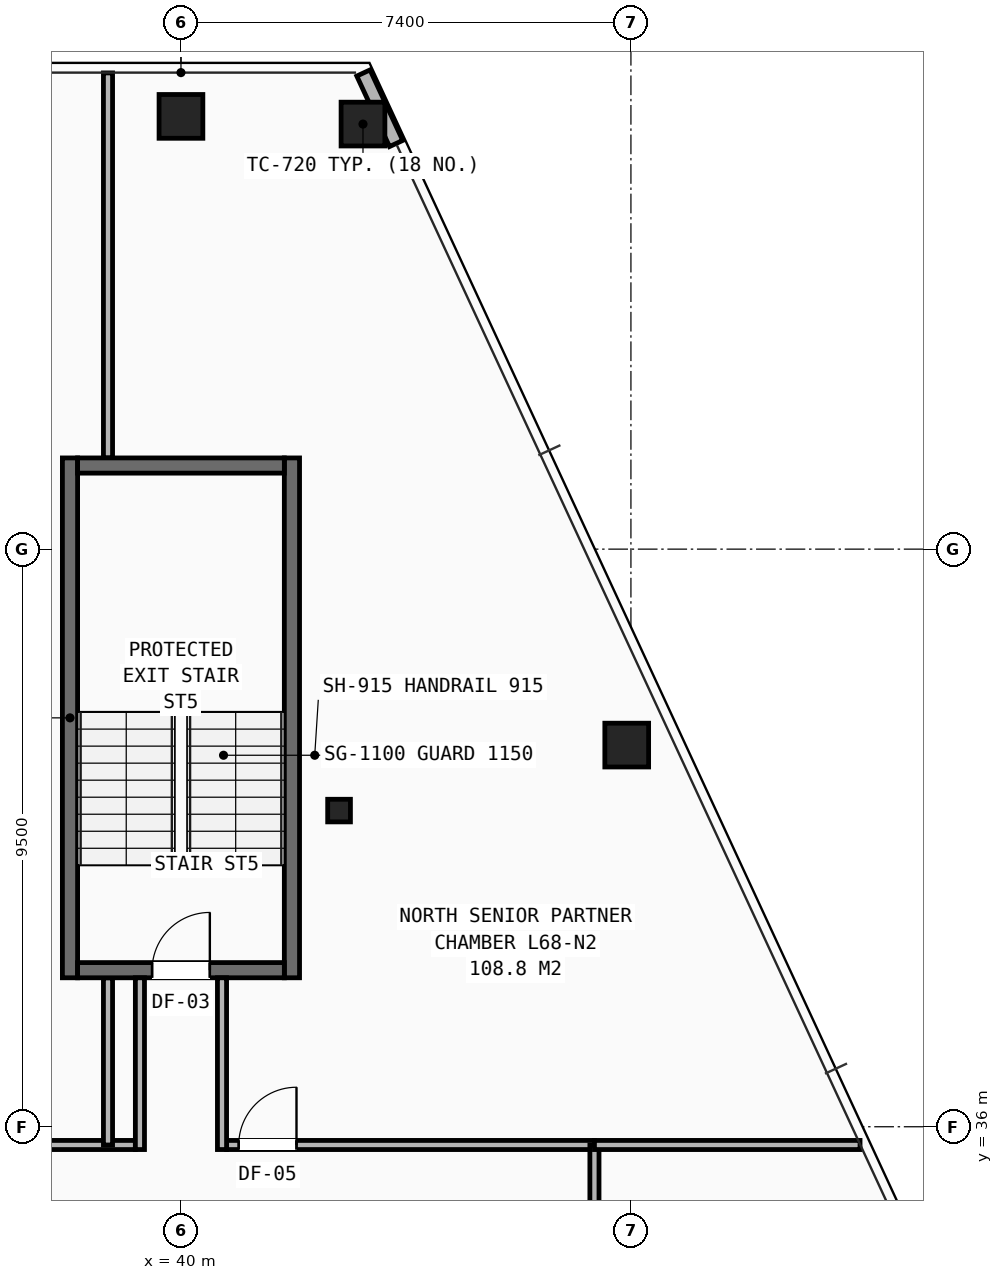
"""IFC4 building model, lengths in metres.
Left out: names, types, materials, properties, quantities, classifications, styles, units other than length and angle.
Written with IfcOpenShell. Run it as: python <this file> out.ifc"""

import sys

from ifc_helpers import new_model, si_unit, direction, frame, frame_2d, origin, origin_2d, place, context, subcontext, project, spatial, rectangle, hollow_rectangle, i_section, extrude, element, fill, save


model = new_model("IFC4")
c1 = context("Model", 3, precision=1e-05, world=origin(), true_north=direction((0.0, 1.0)))
c2 = subcontext(c1, "Body", "Model", "MODEL_VIEW")
j1 = project(units=[si_unit("LENGTHUNIT", "METRE"), si_unit("PLANEANGLEUNIT", "RADIAN")], contexts=[c1])
p1 = place(None, origin())
s1 = spatial("IfcSite", under=j1, at=p1, CompositionType="ELEMENT")
p2 = place(p1, origin())
s2 = spatial("IfcBuilding", under=s1, at=p2, CompositionType="ELEMENT")
p3 = place(p2, frame((0.0, 0.0, 239.9)))
s3 = spatial("IfcBuildingStorey", under=s2, at=p3, CompositionType="ELEMENT", Elevation=239.9)
p4 = place(p3, frame((42.6, 41.2, 0.0), z_axis=(0.0, 0.0, 1.0), x_axis=(1.0, 0.0, 0.0)))
e1 = element("IfcColumn", 1, at=p4, inside=s3, PredefinedType="COLUMN", context=c2, shape_type="SweptSolid", body=[
    extrude(i_section(OverallWidth=0.374, OverallDepth=0.372, WebThickness=0.016, FlangeThickness=0.026, at=origin_2d()), origin(), (0.0, 0.0, 1.0), 3.5),
])
for number, where, z_axis, x_axis in (
    (2, (42.993, 52.491, 0.0), (0.0, 0.0, 1.0), (1.0, 0.0, 0.0)),
    (3, (40.0, 52.617, 0.0), (0.0, 0.0, 1.0), (1.0, 0.0, 0.0)),
    (4, (47.331, 42.277, 0.0), (0.0, 0.0, 1.0), (1.0, 0.0, 0.0)),
):
    element("IfcColumn", number, at=place(p3, frame(where, z_axis=z_axis, x_axis=x_axis)), inside=s3, PredefinedType="COLUMN", context=c2, shape_type="SweptSolid", body=[
        extrude(hollow_rectangle(XDim=0.72, YDim=0.72, WallThickness=0.05, at=origin_2d()), origin(), (0.0, 0.0, 1.0), 3.5),
    ])
p5 = place(p3, frame((43.538, 52.171, 0.0), z_axis=(0.0, 0.0, 1.0), x_axis=(-0.420510858271, 0.907287505742, 0.0)))
e5 = element("IfcWall", 5, at=p5, inside=s3, PredefinedType="SHEAR", context=c2, shape_type="SweptSolid", body=[
    extrude(rectangle(XDim=1.278, YDim=0.24, at=frame_2d((0.639, 0.0))), origin(), (0.0, 0.0, 1.0), 2.623),
])
p6 = place(p3, frame((29.8, 35.7, 0.0), z_axis=(0.0, 0.0, 1.0), x_axis=(1.0, 0.0, 0.0)))
e6 = element("IfcWall", 6, at=p6, inside=s3, PredefinedType="PARTITIONING", context=c2, shape_type="SweptSolid", body=[
    extrude(rectangle(XDim=9.45, YDim=0.15, at=frame_2d((4.725, 0.0))), origin(), (0.0, 0.0, 1.0), 2.628),
])
p7 = place(p6, frame((0.55, 0.0, 0.0)))
e7 = element("IfcOpeningElement", 7, at=p7, cuts=e6, PredefinedType="OPENING", context=c2, shape_type="SweptSolid", body=[
    extrude(rectangle(XDim=0.95, YDim=2.1, at=frame_2d((0.475, 1.05))), frame((0.0, 0.085, 0.0), z_axis=(0.0, -1.0, 0.0), x_axis=(1.0, 0.0, 0.0)), (0.0, 0.0, 1.0), 0.17),
])
p8 = place(p3, frame((40.75, 35.7, 0.0), z_axis=(0.0, 0.0, 1.0), x_axis=(1.0, 0.0, 0.0)))
e8 = element("IfcWall", 8, at=p8, inside=s3, PredefinedType="PARTITIONING", context=c2, shape_type="SweptSolid", body=[
    extrude(rectangle(XDim=6.05, YDim=0.15, at=frame_2d((3.025, 0.0))), origin(), (0.0, 0.0, 1.0), 3.25),
])
p9 = place(p8, frame((0.2, 0.0, 0.0)))
e9 = element("IfcOpeningElement", 9, at=p9, cuts=e8, PredefinedType="OPENING", context=c2, shape_type="SweptSolid", body=[
    extrude(rectangle(XDim=0.95, YDim=2.1, at=frame_2d((0.475, 1.05))), frame((0.0, 0.085, 0.0), z_axis=(0.0, -1.0, 0.0), x_axis=(1.0, 0.0, 0.0)), (0.0, 0.0, 1.0), 0.17),
])
p10 = place(p3, frame((46.8, 31.2, 0.0), z_axis=(0.0, 0.0, 1.0), x_axis=(0.0, 1.0, 0.0)))
e10 = element("IfcWall", 10, at=p10, inside=s3, PredefinedType="PARTITIONING", context=c2, shape_type="SweptSolid", body=[
    extrude(rectangle(XDim=4.5, YDim=0.15, at=frame_2d((2.25, 0.0))), origin(), (0.0, 0.0, 1.0), 2.705),
])
p11 = place(p3, frame((46.8, 35.7, 0.0), z_axis=(0.0, 0.0, 1.0), x_axis=(1.0, 0.0, 0.0)))
e11 = element("IfcWall", 11, at=p11, inside=s3, PredefinedType="PARTITIONING", context=c2, shape_type="SweptSolid", body=[
    extrude(rectangle(XDim=4.368, YDim=0.15, at=frame_2d((2.184, 0.0))), origin(), (0.0, 0.0, 1.0), 2.628),
])
p12 = place(p3, frame((38.8, 35.7, 0.0), z_axis=(0.0, 0.0, 1.0), x_axis=(0.0, 1.0, 0.0)))
e12 = element("IfcWall", 12, at=p12, inside=s3, PredefinedType="PARTITIONING", context=c2, shape_type="SweptSolid", body=[
    extrude(rectangle(XDim=2.75, YDim=0.15, at=frame_2d((1.375, 0.0))), origin(), (0.0, 0.0, 1.0), 3.25),
])
p13 = place(p3, frame((38.8, 47.0, 0.0), z_axis=(0.0, 0.0, 1.0), x_axis=(0.0, 1.0, 0.0)))
e13 = element("IfcWall", 13, at=p13, inside=s3, PredefinedType="PARTITIONING", context=c2, shape_type="SweptSolid", body=[
    extrude(rectangle(XDim=6.332, YDim=0.15, at=frame_2d((3.166, 0.0))), origin(), (0.0, 0.0, 1.0), 2.628),
])
for number, where, z_axis, x_axis in (
    (14, (38.175, 38.45, 0.0), (0.0, 0.0, 1.0), (0.0, 1.0, 0.0)),
    (15, (41.825, 38.45, 0.0), (0.0, 0.0, 1.0), (0.0, 1.0, 0.0)),
):
    element("IfcWall", number, at=place(p3, frame(where, z_axis=z_axis, x_axis=x_axis)), inside=s3, PredefinedType="SHEAR", context=c2, shape_type="SweptSolid", body=[
        extrude(rectangle(XDim=8.55, YDim=0.25, at=frame_2d((4.275, 0.0))), origin(), (0.0, 0.0, 1.0), 3.25),
    ])
p14 = place(p3, frame((38.3, 38.575, 0.0), z_axis=(0.0, 0.0, 1.0), x_axis=(1.0, 0.0, 0.0)))
e16 = element("IfcWall", 16, at=p14, inside=s3, PredefinedType="SHEAR", context=c2, shape_type="SweptSolid", body=[
    extrude(rectangle(XDim=3.4, YDim=0.25, at=frame_2d((1.7, 0.0))), origin(), (0.0, 0.0, 1.0), 3.25),
])
p15 = place(p14, frame((1.225, 0.0, 0.0)))
e17 = element("IfcOpeningElement", 17, at=p15, cuts=e16, PredefinedType="OPENING", context=c2, shape_type="SweptSolid", body=[
    extrude(rectangle(XDim=0.95, YDim=2.1, at=frame_2d((0.475, 1.05))), frame((0.0, 0.135, 0.0), z_axis=(0.0, -1.0, 0.0), x_axis=(1.0, 0.0, 0.0)), (0.0, 0.0, 1.0), 0.27),
])
p16 = place(p3, frame((38.3, 46.875, 0.0), z_axis=(0.0, 0.0, 1.0), x_axis=(1.0, 0.0, 0.0)))
e18 = element("IfcWall", 18, at=p16, inside=s3, PredefinedType="SHEAR", context=c2, shape_type="SweptSolid", body=[
    extrude(rectangle(XDim=3.4, YDim=0.25, at=frame_2d((1.7, 0.0))), origin(), (0.0, 0.0, 1.0), 3.25),
])
for number, where, z_axis, x_axis in (
    (19, (39.325, 35.625, 0.0), (0.0, 0.0, 1.0), (0.0, 1.0, 0.0)),
    (20, (40.675, 35.625, 0.0), (0.0, 0.0, 1.0), (0.0, 1.0, 0.0)),
):
    element("IfcWall", number, at=place(p3, frame(where, z_axis=z_axis, x_axis=x_axis)), inside=s3, PredefinedType="PARTITIONING", context=c2, shape_type="SweptSolid", body=[
        extrude(rectangle(XDim=2.825, YDim=0.15, at=frame_2d((1.413, 0.0))), origin(), (0.0, 0.0, 1.0), 3.25),
    ])
p17 = place(p9, origin())
e21 = element("IfcDoor", 21, at=p17, inside=s3, OperationType="SINGLE_SWING_RIGHT", PredefinedType="DOOR", context=c2, shape_type="SweptSolid", body=[
    extrude(rectangle(XDim=0.95, YDim=2.1, at=frame_2d((0.475, 1.05))), frame((0.0, 0.025, 0.0), z_axis=(0.0, -1.0, 0.0), x_axis=(1.0, 0.0, 0.0)), (0.0, 0.0, 1.0), 0.05),
])
fill(e9, e21)
p18 = place(p15, origin())
e22 = element("IfcDoor", 22, at=p18, inside=s3, OperationType="SINGLE_SWING_RIGHT", PredefinedType="DOOR", context=c2, shape_type="SweptSolid", body=[
    extrude(rectangle(XDim=0.95, YDim=2.1, at=frame_2d((0.475, 1.05))), frame((0.0, 0.025, 0.0), z_axis=(0.0, -1.0, 0.0), x_axis=(1.0, 0.0, 0.0)), (0.0, 0.0, 1.0), 0.05),
])
fill(e17, e22)
save(model, sys.argv[1])
